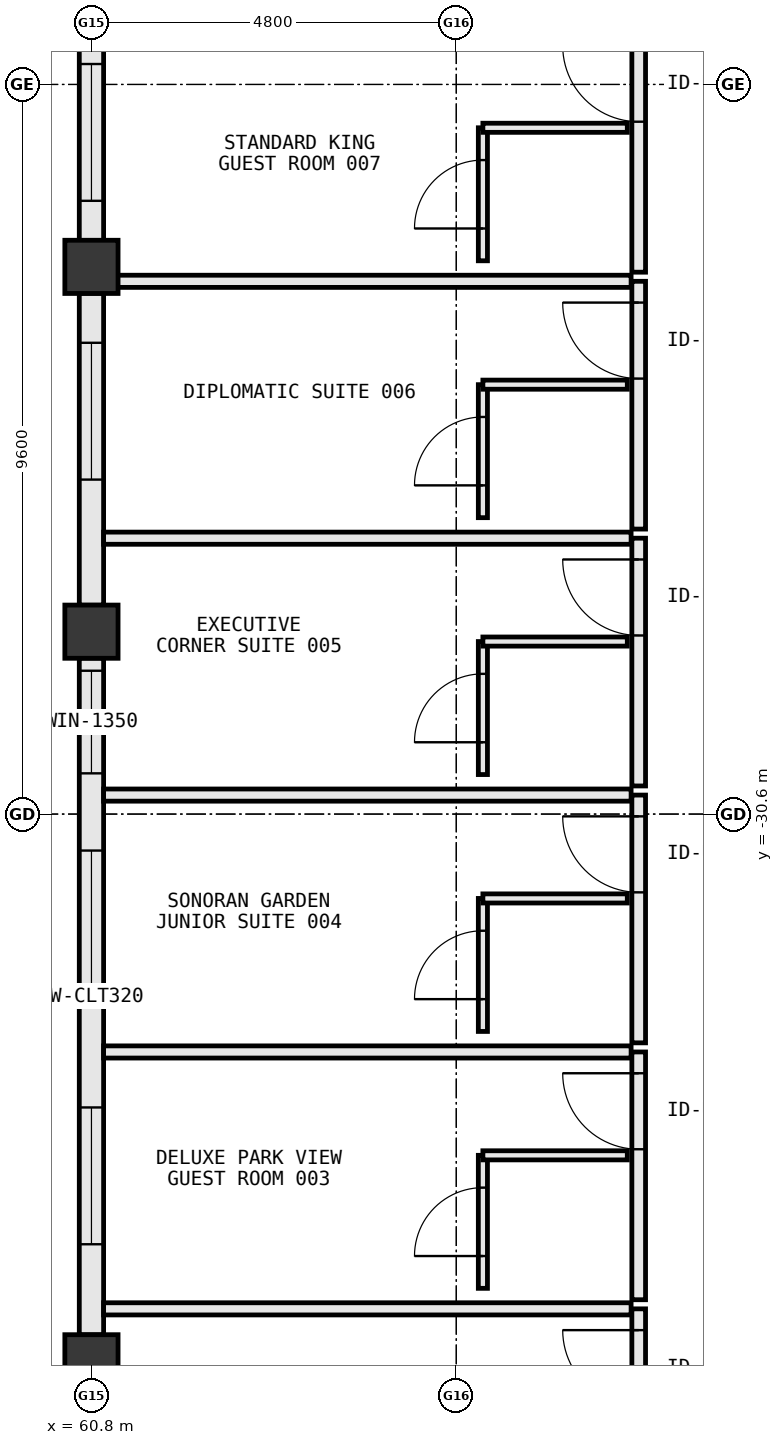
"""IFC4 building model, lengths in metres.
Left out: names, types, materials, properties, quantities, classifications, styles, units other than length and angle.
Written with IfcOpenShell. Run it as: python <this file> out.ifc"""

import sys

from ifc_helpers import new_model, si_unit, direction, frame, frame_2d, origin, origin_2d, place, context, subcontext, project, spatial, rectangle, extrude, element, fill, save


model = new_model("IFC4")
c1 = context("Model", 3, precision=1e-05, world=origin(), true_north=direction((0.0, 1.0)))
c2 = subcontext(c1, "Body", "Model", "MODEL_VIEW")
j1 = project(units=[si_unit("LENGTHUNIT", "METRE"), si_unit("PLANEANGLEUNIT", "RADIAN")], contexts=[c1])
p1 = place(None, origin())
s1 = spatial("IfcSite", under=j1, at=p1, CompositionType="ELEMENT")
p2 = place(p1, origin())
s2 = spatial("IfcBuilding", under=s1, at=p2, CompositionType="ELEMENT")
p3 = place(p2, frame((0.0, 0.0, 10.8)))
s3 = spatial("IfcBuildingStorey", under=s2, at=p3, CompositionType="ELEMENT", Elevation=10.8)
for number, where, z_axis, x_axis in (
    (1, (60.8, -37.8, 0.0), (0.0, 0.0, 1.0), (1.0, 0.0, 0.0)),
    (2, (60.8, -28.2, 0.0), (0.0, 0.0, 1.0), (1.0, 0.0, 0.0)),
    (3, (60.8, -23.4, 0.0), (0.0, 0.0, 1.0), (1.0, 0.0, 0.0)),
):
    element("IfcColumn", number, at=place(p3, frame(where, z_axis=z_axis, x_axis=x_axis)), inside=s3, PredefinedType="COLUMN", context=c2, shape_type="SweptSolid", body=[
        extrude(rectangle(XDim=0.7, YDim=0.7, at=origin_2d()), origin(), (0.0, 0.0, 1.0), 5.4),
    ])
p4 = place(p3, frame((60.8, -18.948, 0.0), z_axis=(0.0, 0.0, 1.0), x_axis=(0.0, -1.0, 0.0)))
e4 = element("IfcWall", 4, at=p4, inside=s3, PredefinedType="STANDARD", context=c2, shape_type="SweptSolid", body=[
    extrude(rectangle(XDim=4.104, YDim=0.32, at=frame_2d((2.052, 0.0))), origin(), (0.0, 0.0, 1.0), 4.255),
])
p5 = place(p4, frame((1.783, 0.0, 0.85)))
e5 = element("IfcOpeningElement", 5, at=p5, cuts=e4, PredefinedType="OPENING", context=c2, shape_type="SweptSolid", body=[
    extrude(rectangle(XDim=1.8, YDim=1.85, at=frame_2d((0.9, 0.925))), frame((0.0, 0.172, 0.0), z_axis=(0.0, -1.0, 0.0), x_axis=(1.0, 0.0, 0.0)), (0.0, 0.0, 1.0), 0.344),
])
p6 = place(p3, frame((60.8, -23.748, 0.0), z_axis=(0.0, 0.0, 1.0), x_axis=(0.0, -1.0, 0.0)))
e6 = element("IfcWall", 6, at=p6, inside=s3, PredefinedType="STANDARD", context=c2, shape_type="SweptSolid", body=[
    extrude(rectangle(XDim=4.104, YDim=0.32, at=frame_2d((2.052, 0.0))), origin(), (0.0, 0.0, 1.0), 4.255),
])
p7 = place(p6, frame((0.651, 0.0, 0.85)))
e7 = element("IfcOpeningElement", 7, at=p7, cuts=e6, PredefinedType="OPENING", context=c2, shape_type="SweptSolid", body=[
    extrude(rectangle(XDim=1.8, YDim=1.85, at=frame_2d((0.9, 0.925))), frame((0.0, 0.172, 0.0), z_axis=(0.0, -1.0, 0.0), x_axis=(1.0, 0.0, 0.0)), (0.0, 0.0, 1.0), 0.344),
])
p8 = place(p3, frame((60.8, -28.548, 0.0), z_axis=(0.0, 0.0, 1.0), x_axis=(0.0, -1.0, 0.0)))
e8 = element("IfcWall", 8, at=p8, inside=s3, PredefinedType="STANDARD", context=c2, shape_type="SweptSolid", body=[
    extrude(rectangle(XDim=8.904, YDim=0.32, at=frame_2d((4.452, 0.0))), origin(), (0.0, 0.0, 1.0), 4.155),
])
p9 = place(p8, frame((5.912, 0.0, 0.85)))
e9 = element("IfcOpeningElement", 9, at=p9, cuts=e8, PredefinedType="OPENING", context=c2, shape_type="SweptSolid", body=[
    extrude(rectangle(XDim=1.8, YDim=1.85, at=frame_2d((0.9, 0.925))), frame((0.0, 0.172, 0.0), z_axis=(0.0, -1.0, 0.0), x_axis=(1.0, 0.0, 0.0)), (0.0, 0.0, 1.0), 0.344),
])
p10 = place(p8, frame((2.532, 0.0, 0.85)))
e10 = element("IfcOpeningElement", 10, at=p10, cuts=e8, PredefinedType="OPENING", context=c2, shape_type="SweptSolid", body=[
    extrude(rectangle(XDim=1.8, YDim=1.85, at=frame_2d((0.9, 0.925))), frame((0.0, 0.172, 0.0), z_axis=(0.0, -1.0, 0.0), x_axis=(1.0, 0.0, 0.0)), (0.0, 0.0, 1.0), 0.344),
])
p11 = place(p8, frame((0.166, 0.0, 0.85)))
e11 = element("IfcOpeningElement", 11, at=p11, cuts=e8, PredefinedType="OPENING", context=c2, shape_type="SweptSolid", body=[
    extrude(rectangle(XDim=1.35, YDim=1.65, at=frame_2d((0.675, 0.825))), frame((0.0, 0.172, 0.0), z_axis=(0.0, -1.0, 0.0), x_axis=(1.0, 0.0, 0.0)), (0.0, 0.0, 1.0), 0.344),
])
p12 = place(p3, frame((68.0, -40.37, 0.0), z_axis=(0.0, 0.0, 1.0), x_axis=(0.0, 1.0, 0.0)))
e12 = element("IfcWall", 12, at=p12, inside=s3, PredefinedType="PARTITIONING", context=c2, shape_type="SweptSolid", body=[
    extrude(rectangle(XDim=3.26, YDim=0.18, at=frame_2d((1.63, 0.0))), origin(), (0.0, 0.0, 1.0), 4.8),
])
p13 = place(p12, frame((1.98, 0.0, 0.0)))
e13 = element("IfcOpeningElement", 13, at=p13, cuts=e12, PredefinedType="OPENING", context=c2, shape_type="SweptSolid", body=[
    extrude(rectangle(XDim=1.0, YDim=2.2, at=frame_2d((0.5, 1.1))), frame((0.0, 0.102, 0.0), z_axis=(0.0, -1.0, 0.0), x_axis=(1.0, 0.0, 0.0)), (0.0, 0.0, 1.0), 0.204),
])
p14 = place(p3, frame((60.96, -37.11, 0.0), z_axis=(0.0, 0.0, 1.0), x_axis=(1.0, 0.0, 0.0)))
e14 = element("IfcWall", 14, at=p14, inside=s3, PredefinedType="PARTITIONING", context=c2, shape_type="SweptSolid", body=[
    extrude(rectangle(XDim=6.94, YDim=0.16, at=frame_2d((3.47, 0.0))), origin(), (0.0, 0.0, 1.0), 4.8),
])
p15 = place(p3, frame((68.0, -36.99, 0.0), z_axis=(0.0, 0.0, 1.0), x_axis=(0.0, 1.0, 0.0)))
e15 = element("IfcWall", 15, at=p15, inside=s3, PredefinedType="PARTITIONING", context=c2, shape_type="SweptSolid", body=[
    extrude(rectangle(XDim=3.26, YDim=0.18, at=frame_2d((1.63, 0.0))), origin(), (0.0, 0.0, 1.0), 4.8),
])
p16 = place(p15, frame((1.98, 0.0, 0.0)))
e16 = element("IfcOpeningElement", 16, at=p16, cuts=e15, PredefinedType="OPENING", context=c2, shape_type="SweptSolid", body=[
    extrude(rectangle(XDim=1.0, YDim=2.2, at=frame_2d((0.5, 1.1))), frame((0.0, 0.102, 0.0), z_axis=(0.0, -1.0, 0.0), x_axis=(1.0, 0.0, 0.0)), (0.0, 0.0, 1.0), 0.204),
])
p17 = place(p3, frame((60.96, -33.73, 0.0), z_axis=(0.0, 0.0, 1.0), x_axis=(1.0, 0.0, 0.0)))
e17 = element("IfcWall", 17, at=p17, inside=s3, PredefinedType="PARTITIONING", context=c2, shape_type="SweptSolid", body=[
    extrude(rectangle(XDim=6.94, YDim=0.16, at=frame_2d((3.47, 0.0))), origin(), (0.0, 0.0, 1.0), 4.8),
])
p18 = place(p3, frame((65.95, -36.84, 0.0), z_axis=(0.0, 0.0, 1.0), x_axis=(0.0, 1.0, 0.0)))
e18 = element("IfcWall", 18, at=p18, inside=s3, PredefinedType="PARTITIONING", context=c2, shape_type="SweptSolid", body=[
    extrude(rectangle(XDim=1.75, YDim=0.12, at=frame_2d((0.875, 0.0))), origin(), (0.0, 0.0, 1.0), 4.8),
])
p19 = place(p18, frame((0.425, 0.0, 0.0)))
e19 = element("IfcOpeningElement", 19, at=p19, cuts=e18, PredefinedType="OPENING", context=c2, shape_type="SweptSolid", body=[
    extrude(rectangle(XDim=0.9, YDim=2.15, at=frame_2d((0.45, 1.075))), frame((0.0, 0.072, 0.0), z_axis=(0.0, -1.0, 0.0), x_axis=(1.0, 0.0, 0.0)), (0.0, 0.0, 1.0), 0.144),
])
p20 = place(p3, frame((65.95, -35.09, 0.0), z_axis=(0.0, 0.0, 1.0), x_axis=(1.0, 0.0, 0.0)))
e20 = element("IfcWall", 20, at=p20, inside=s3, PredefinedType="PARTITIONING", context=c2, shape_type="SweptSolid", body=[
    extrude(rectangle(XDim=1.9, YDim=0.12, at=frame_2d((0.95, 0.0))), origin(), (0.0, 0.0, 1.0), 4.8),
])
p21 = place(p3, frame((68.0, -33.61, 0.0), z_axis=(0.0, 0.0, 1.0), x_axis=(0.0, 1.0, 0.0)))
e21 = element("IfcWall", 21, at=p21, inside=s3, PredefinedType="PARTITIONING", context=c2, shape_type="SweptSolid", body=[
    extrude(rectangle(XDim=3.26, YDim=0.18, at=frame_2d((1.63, 0.0))), origin(), (0.0, 0.0, 1.0), 4.8),
])
p22 = place(p21, frame((1.98, 0.0, 0.0)))
e22 = element("IfcOpeningElement", 22, at=p22, cuts=e21, PredefinedType="OPENING", context=c2, shape_type="SweptSolid", body=[
    extrude(rectangle(XDim=1.0, YDim=2.2, at=frame_2d((0.5, 1.1))), frame((0.0, 0.102, 0.0), z_axis=(0.0, -1.0, 0.0), x_axis=(1.0, 0.0, 0.0)), (0.0, 0.0, 1.0), 0.204),
])
p23 = place(p3, frame((60.96, -30.35, 0.0), z_axis=(0.0, 0.0, 1.0), x_axis=(1.0, 0.0, 0.0)))
e23 = element("IfcWall", 23, at=p23, inside=s3, PredefinedType="PARTITIONING", context=c2, shape_type="SweptSolid", body=[
    extrude(rectangle(XDim=6.94, YDim=0.16, at=frame_2d((3.47, 0.0))), origin(), (0.0, 0.0, 1.0), 4.8),
])
p24 = place(p3, frame((65.95, -33.46, 0.0), z_axis=(0.0, 0.0, 1.0), x_axis=(0.0, 1.0, 0.0)))
e24 = element("IfcWall", 24, at=p24, inside=s3, PredefinedType="PARTITIONING", context=c2, shape_type="SweptSolid", body=[
    extrude(rectangle(XDim=1.75, YDim=0.12, at=frame_2d((0.875, 0.0))), origin(), (0.0, 0.0, 1.0), 4.8),
])
p25 = place(p24, frame((0.425, 0.0, 0.0)))
e25 = element("IfcOpeningElement", 25, at=p25, cuts=e24, PredefinedType="OPENING", context=c2, shape_type="SweptSolid", body=[
    extrude(rectangle(XDim=0.9, YDim=2.15, at=frame_2d((0.45, 1.075))), frame((0.0, 0.072, 0.0), z_axis=(0.0, -1.0, 0.0), x_axis=(1.0, 0.0, 0.0)), (0.0, 0.0, 1.0), 0.144),
])
p26 = place(p3, frame((65.95, -31.71, 0.0), z_axis=(0.0, 0.0, 1.0), x_axis=(1.0, 0.0, 0.0)))
e26 = element("IfcWall", 26, at=p26, inside=s3, PredefinedType="PARTITIONING", context=c2, shape_type="SweptSolid", body=[
    extrude(rectangle(XDim=1.9, YDim=0.12, at=frame_2d((0.95, 0.0))), origin(), (0.0, 0.0, 1.0), 4.8),
])
p27 = place(p3, frame((68.0, -30.23, 0.0), z_axis=(0.0, 0.0, 1.0), x_axis=(0.0, 1.0, 0.0)))
e27 = element("IfcWall", 27, at=p27, inside=s3, PredefinedType="PARTITIONING", context=c2, shape_type="SweptSolid", body=[
    extrude(rectangle(XDim=3.26, YDim=0.18, at=frame_2d((1.63, 0.0))), origin(), (0.0, 0.0, 1.0), 4.8),
])
p28 = place(p27, frame((1.98, 0.0, 0.0)))
e28 = element("IfcOpeningElement", 28, at=p28, cuts=e27, PredefinedType="OPENING", context=c2, shape_type="SweptSolid", body=[
    extrude(rectangle(XDim=1.0, YDim=2.2, at=frame_2d((0.5, 1.1))), frame((0.0, 0.102, 0.0), z_axis=(0.0, -1.0, 0.0), x_axis=(1.0, 0.0, 0.0)), (0.0, 0.0, 1.0), 0.204),
])
p29 = place(p3, frame((60.96, -26.97, 0.0), z_axis=(0.0, 0.0, 1.0), x_axis=(1.0, 0.0, 0.0)))
e29 = element("IfcWall", 29, at=p29, inside=s3, PredefinedType="PARTITIONING", context=c2, shape_type="SweptSolid", body=[
    extrude(rectangle(XDim=6.94, YDim=0.16, at=frame_2d((3.47, 0.0))), origin(), (0.0, 0.0, 1.0), 4.8),
])
p30 = place(p3, frame((65.95, -30.08, 0.0), z_axis=(0.0, 0.0, 1.0), x_axis=(0.0, 1.0, 0.0)))
e30 = element("IfcWall", 30, at=p30, inside=s3, PredefinedType="PARTITIONING", context=c2, shape_type="SweptSolid", body=[
    extrude(rectangle(XDim=1.75, YDim=0.12, at=frame_2d((0.875, 0.0))), origin(), (0.0, 0.0, 1.0), 4.8),
])
p31 = place(p30, frame((0.425, 0.0, 0.0)))
e31 = element("IfcOpeningElement", 31, at=p31, cuts=e30, PredefinedType="OPENING", context=c2, shape_type="SweptSolid", body=[
    extrude(rectangle(XDim=0.9, YDim=2.15, at=frame_2d((0.45, 1.075))), frame((0.0, 0.072, 0.0), z_axis=(0.0, -1.0, 0.0), x_axis=(1.0, 0.0, 0.0)), (0.0, 0.0, 1.0), 0.144),
])
p32 = place(p3, frame((65.95, -28.33, 0.0), z_axis=(0.0, 0.0, 1.0), x_axis=(1.0, 0.0, 0.0)))
e32 = element("IfcWall", 32, at=p32, inside=s3, PredefinedType="PARTITIONING", context=c2, shape_type="SweptSolid", body=[
    extrude(rectangle(XDim=1.9, YDim=0.12, at=frame_2d((0.95, 0.0))), origin(), (0.0, 0.0, 1.0), 3.775),
])
p33 = place(p3, frame((68.0, -26.85, 0.0), z_axis=(0.0, 0.0, 1.0), x_axis=(0.0, 1.0, 0.0)))
e33 = element("IfcWall", 33, at=p33, inside=s3, PredefinedType="PARTITIONING", context=c2, shape_type="SweptSolid", body=[
    extrude(rectangle(XDim=3.26, YDim=0.18, at=frame_2d((1.63, 0.0))), origin(), (0.0, 0.0, 1.0), 4.8),
])
p34 = place(p33, frame((1.98, 0.0, 0.0)))
e34 = element("IfcOpeningElement", 34, at=p34, cuts=e33, PredefinedType="OPENING", context=c2, shape_type="SweptSolid", body=[
    extrude(rectangle(XDim=1.0, YDim=2.2, at=frame_2d((0.5, 1.1))), frame((0.0, 0.102, 0.0), z_axis=(0.0, -1.0, 0.0), x_axis=(1.0, 0.0, 0.0)), (0.0, 0.0, 1.0), 0.204),
])
p35 = place(p3, frame((60.96, -23.59, 0.0), z_axis=(0.0, 0.0, 1.0), x_axis=(1.0, 0.0, 0.0)))
e35 = element("IfcWall", 35, at=p35, inside=s3, PredefinedType="PARTITIONING", context=c2, shape_type="SweptSolid", body=[
    extrude(rectangle(XDim=6.94, YDim=0.16, at=frame_2d((3.47, 0.0))), origin(), (0.0, 0.0, 1.0), 4.075),
])
p36 = place(p3, frame((65.95, -26.7, 0.0), z_axis=(0.0, 0.0, 1.0), x_axis=(0.0, 1.0, 0.0)))
e36 = element("IfcWall", 36, at=p36, inside=s3, PredefinedType="PARTITIONING", context=c2, shape_type="SweptSolid", body=[
    extrude(rectangle(XDim=1.75, YDim=0.12, at=frame_2d((0.875, 0.0))), origin(), (0.0, 0.0, 1.0), 4.8),
])
p37 = place(p36, frame((0.425, 0.0, 0.0)))
e37 = element("IfcOpeningElement", 37, at=p37, cuts=e36, PredefinedType="OPENING", context=c2, shape_type="SweptSolid", body=[
    extrude(rectangle(XDim=0.9, YDim=2.15, at=frame_2d((0.45, 1.075))), frame((0.0, 0.072, 0.0), z_axis=(0.0, -1.0, 0.0), x_axis=(1.0, 0.0, 0.0)), (0.0, 0.0, 1.0), 0.144),
])
p38 = place(p3, frame((65.95, -24.95, 0.0), z_axis=(0.0, 0.0, 1.0), x_axis=(1.0, 0.0, 0.0)))
e38 = element("IfcWall", 38, at=p38, inside=s3, PredefinedType="PARTITIONING", context=c2, shape_type="SweptSolid", body=[
    extrude(rectangle(XDim=1.9, YDim=0.12, at=frame_2d((0.95, 0.0))), origin(), (0.0, 0.0, 1.0), 4.8),
])
p39 = place(p3, frame((68.0, -23.47, 0.0), z_axis=(0.0, 0.0, 1.0), x_axis=(0.0, 1.0, 0.0)))
e39 = element("IfcWall", 39, at=p39, inside=s3, PredefinedType="PARTITIONING", context=c2, shape_type="SweptSolid", body=[
    extrude(rectangle(XDim=3.26, YDim=0.18, at=frame_2d((1.63, 0.0))), origin(), (0.0, 0.0, 1.0), 4.8),
])
p40 = place(p39, frame((1.98, 0.0, 0.0)))
e40 = element("IfcOpeningElement", 40, at=p40, cuts=e39, PredefinedType="OPENING", context=c2, shape_type="SweptSolid", body=[
    extrude(rectangle(XDim=1.0, YDim=2.2, at=frame_2d((0.5, 1.1))), frame((0.0, 0.102, 0.0), z_axis=(0.0, -1.0, 0.0), x_axis=(1.0, 0.0, 0.0)), (0.0, 0.0, 1.0), 0.204),
])
p41 = place(p3, frame((65.95, -23.32, 0.0), z_axis=(0.0, 0.0, 1.0), x_axis=(0.0, 1.0, 0.0)))
e41 = element("IfcWall", 41, at=p41, inside=s3, PredefinedType="PARTITIONING", context=c2, shape_type="SweptSolid", body=[
    extrude(rectangle(XDim=1.75, YDim=0.12, at=frame_2d((0.875, 0.0))), origin(), (0.0, 0.0, 1.0), 4.8),
])
p42 = place(p41, frame((0.425, 0.0, 0.0)))
e42 = element("IfcOpeningElement", 42, at=p42, cuts=e41, PredefinedType="OPENING", context=c2, shape_type="SweptSolid", body=[
    extrude(rectangle(XDim=0.9, YDim=2.15, at=frame_2d((0.45, 1.075))), frame((0.0, 0.072, 0.0), z_axis=(0.0, -1.0, 0.0), x_axis=(1.0, 0.0, 0.0)), (0.0, 0.0, 1.0), 0.144),
])
p43 = place(p3, frame((65.95, -21.57, 0.0), z_axis=(0.0, 0.0, 1.0), x_axis=(1.0, 0.0, 0.0)))
e43 = element("IfcWall", 43, at=p43, inside=s3, PredefinedType="PARTITIONING", context=c2, shape_type="SweptSolid", body=[
    extrude(rectangle(XDim=1.9, YDim=0.12, at=frame_2d((0.95, 0.0))), origin(), (0.0, 0.0, 1.0), 4.8),
])
p44 = place(p9, origin())
e44 = element("IfcWindow", 44, at=p44, inside=s3, PartitioningType="SINGLE_PANEL", PredefinedType="WINDOW", context=c2, shape_type="SweptSolid", body=[
    extrude(rectangle(XDim=1.8, YDim=1.85, at=frame_2d((0.9, 0.925))), frame((0.0, 0.03, 0.0), z_axis=(0.0, -1.0, 0.0), x_axis=(1.0, 0.0, 0.0)), (0.0, 0.0, 1.0), 0.06),
])
fill(e9, e44)
p45 = place(p10, origin())
e45 = element("IfcWindow", 45, at=p45, inside=s3, PartitioningType="SINGLE_PANEL", PredefinedType="WINDOW", context=c2, shape_type="SweptSolid", body=[
    extrude(rectangle(XDim=1.8, YDim=1.85, at=frame_2d((0.9, 0.925))), frame((0.0, 0.03, 0.0), z_axis=(0.0, -1.0, 0.0), x_axis=(1.0, 0.0, 0.0)), (0.0, 0.0, 1.0), 0.06),
])
fill(e10, e45)
p46 = place(p11, origin())
e46 = element("IfcWindow", 46, at=p46, inside=s3, PartitioningType="SINGLE_PANEL", PredefinedType="WINDOW", context=c2, shape_type="SweptSolid", body=[
    extrude(rectangle(XDim=1.35, YDim=1.65, at=frame_2d((0.675, 0.825))), frame((0.0, 0.03, 0.0), z_axis=(0.0, -1.0, 0.0), x_axis=(1.0, 0.0, 0.0)), (0.0, 0.0, 1.0), 0.06),
])
fill(e11, e46)
p47 = place(p7, origin())
e47 = element("IfcWindow", 47, at=p47, inside=s3, PartitioningType="SINGLE_PANEL", PredefinedType="WINDOW", context=c2, shape_type="SweptSolid", body=[
    extrude(rectangle(XDim=1.8, YDim=1.85, at=frame_2d((0.9, 0.925))), frame((0.0, 0.03, 0.0), z_axis=(0.0, -1.0, 0.0), x_axis=(1.0, 0.0, 0.0)), (0.0, 0.0, 1.0), 0.06),
])
fill(e7, e47)
p48 = place(p5, origin())
e48 = element("IfcWindow", 48, at=p48, inside=s3, PartitioningType="SINGLE_PANEL", PredefinedType="WINDOW", context=c2, shape_type="SweptSolid", body=[
    extrude(rectangle(XDim=1.8, YDim=1.85, at=frame_2d((0.9, 0.925))), frame((0.0, 0.03, 0.0), z_axis=(0.0, -1.0, 0.0), x_axis=(1.0, 0.0, 0.0)), (0.0, 0.0, 1.0), 0.06),
])
fill(e5, e48)
p49 = place(p13, origin())
e49 = element("IfcDoor", 49, at=p49, inside=s3, OperationType="SINGLE_SWING_RIGHT", PredefinedType="DOOR", context=c2, shape_type="SweptSolid", body=[
    extrude(rectangle(XDim=1.0, YDim=2.2, at=frame_2d((0.5, 1.1))), frame((0.0, 0.025, 0.0), z_axis=(0.0, -1.0, 0.0), x_axis=(1.0, 0.0, 0.0)), (0.0, 0.0, 1.0), 0.05),
])
fill(e13, e49)
p50 = place(p16, origin())
e50 = element("IfcDoor", 50, at=p50, inside=s3, OperationType="SINGLE_SWING_RIGHT", PredefinedType="DOOR", context=c2, shape_type="SweptSolid", body=[
    extrude(rectangle(XDim=1.0, YDim=2.2, at=frame_2d((0.5, 1.1))), frame((0.0, 0.025, 0.0), z_axis=(0.0, -1.0, 0.0), x_axis=(1.0, 0.0, 0.0)), (0.0, 0.0, 1.0), 0.05),
])
fill(e16, e50)
p51 = place(p19, origin())
e51 = element("IfcDoor", 51, at=p51, inside=s3, OperationType="SINGLE_SWING_LEFT", PredefinedType="DOOR", context=c2, shape_type="SweptSolid", body=[
    extrude(rectangle(XDim=0.9, YDim=2.15, at=frame_2d((0.45, 1.075))), frame((0.0, 0.025, 0.0), z_axis=(0.0, -1.0, 0.0), x_axis=(1.0, 0.0, 0.0)), (0.0, 0.0, 1.0), 0.05),
])
fill(e19, e51)
p52 = place(p22, origin())
e52 = element("IfcDoor", 52, at=p52, inside=s3, OperationType="SINGLE_SWING_RIGHT", PredefinedType="DOOR", context=c2, shape_type="SweptSolid", body=[
    extrude(rectangle(XDim=1.0, YDim=2.2, at=frame_2d((0.5, 1.1))), frame((0.0, 0.025, 0.0), z_axis=(0.0, -1.0, 0.0), x_axis=(1.0, 0.0, 0.0)), (0.0, 0.0, 1.0), 0.05),
])
fill(e22, e52)
p53 = place(p25, origin())
e53 = element("IfcDoor", 53, at=p53, inside=s3, OperationType="SINGLE_SWING_LEFT", PredefinedType="DOOR", context=c2, shape_type="SweptSolid", body=[
    extrude(rectangle(XDim=0.9, YDim=2.15, at=frame_2d((0.45, 1.075))), frame((0.0, 0.025, 0.0), z_axis=(0.0, -1.0, 0.0), x_axis=(1.0, 0.0, 0.0)), (0.0, 0.0, 1.0), 0.05),
])
fill(e25, e53)
p54 = place(p28, origin())
e54 = element("IfcDoor", 54, at=p54, inside=s3, OperationType="SINGLE_SWING_RIGHT", PredefinedType="DOOR", context=c2, shape_type="SweptSolid", body=[
    extrude(rectangle(XDim=1.0, YDim=2.2, at=frame_2d((0.5, 1.1))), frame((0.0, 0.025, 0.0), z_axis=(0.0, -1.0, 0.0), x_axis=(1.0, 0.0, 0.0)), (0.0, 0.0, 1.0), 0.05),
])
fill(e28, e54)
p55 = place(p31, origin())
e55 = element("IfcDoor", 55, at=p55, inside=s3, OperationType="SINGLE_SWING_LEFT", PredefinedType="DOOR", context=c2, shape_type="SweptSolid", body=[
    extrude(rectangle(XDim=0.9, YDim=2.15, at=frame_2d((0.45, 1.075))), frame((0.0, 0.025, 0.0), z_axis=(0.0, -1.0, 0.0), x_axis=(1.0, 0.0, 0.0)), (0.0, 0.0, 1.0), 0.05),
])
fill(e31, e55)
p56 = place(p34, origin())
e56 = element("IfcDoor", 56, at=p56, inside=s3, OperationType="SINGLE_SWING_RIGHT", PredefinedType="DOOR", context=c2, shape_type="SweptSolid", body=[
    extrude(rectangle(XDim=1.0, YDim=2.2, at=frame_2d((0.5, 1.1))), frame((0.0, 0.025, 0.0), z_axis=(0.0, -1.0, 0.0), x_axis=(1.0, 0.0, 0.0)), (0.0, 0.0, 1.0), 0.05),
])
fill(e34, e56)
p57 = place(p37, origin())
e57 = element("IfcDoor", 57, at=p57, inside=s3, OperationType="SINGLE_SWING_LEFT", PredefinedType="DOOR", context=c2, shape_type="SweptSolid", body=[
    extrude(rectangle(XDim=0.9, YDim=2.15, at=frame_2d((0.45, 1.075))), frame((0.0, 0.025, 0.0), z_axis=(0.0, -1.0, 0.0), x_axis=(1.0, 0.0, 0.0)), (0.0, 0.0, 1.0), 0.05),
])
fill(e37, e57)
p58 = place(p40, origin())
e58 = element("IfcDoor", 58, at=p58, inside=s3, OperationType="SINGLE_SWING_RIGHT", PredefinedType="DOOR", context=c2, shape_type="SweptSolid", body=[
    extrude(rectangle(XDim=1.0, YDim=2.2, at=frame_2d((0.5, 1.1))), frame((0.0, 0.025, 0.0), z_axis=(0.0, -1.0, 0.0), x_axis=(1.0, 0.0, 0.0)), (0.0, 0.0, 1.0), 0.05),
])
fill(e40, e58)
p59 = place(p42, origin())
e59 = element("IfcDoor", 59, at=p59, inside=s3, OperationType="SINGLE_SWING_LEFT", PredefinedType="DOOR", context=c2, shape_type="SweptSolid", body=[
    extrude(rectangle(XDim=0.9, YDim=2.15, at=frame_2d((0.45, 1.075))), frame((0.0, 0.025, 0.0), z_axis=(0.0, -1.0, 0.0), x_axis=(1.0, 0.0, 0.0)), (0.0, 0.0, 1.0), 0.05),
])
fill(e42, e59)
save(model, sys.argv[1])
